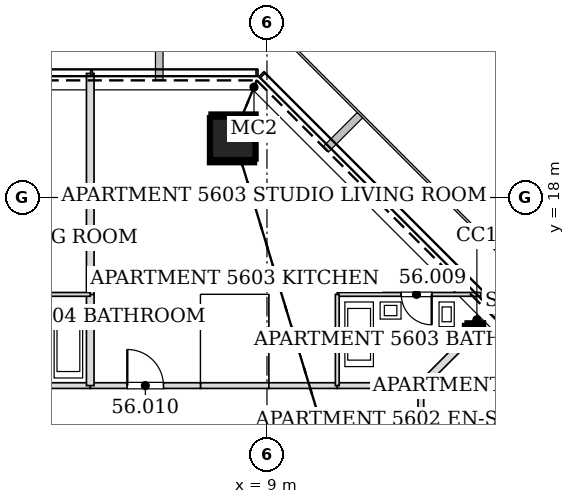
"""IFC4 building model, lengths in metres.
Left out: names, types, materials, properties, quantities, classifications, styles, units other than length and angle.
Written with IfcOpenShell. Run it as: python <this file> out.ifc"""

import sys

from ifc_helpers import new_model, si_unit, direction, frame, frame_2d, origin, origin_2d, place, context, subcontext, project, spatial, rectangle, hollow_rectangle, extrude, element, fill, save


model = new_model("IFC4")
c1 = context("Model", 3, precision=1e-05, world=origin(), true_north=direction((0.0, 1.0)))
c2 = subcontext(c1, "Body", "Model", "MODEL_VIEW")
j1 = project(units=[si_unit("LENGTHUNIT", "METRE"), si_unit("PLANEANGLEUNIT", "RADIAN")], contexts=[c1])
p1 = place(None, origin())
s1 = spatial("IfcSite", under=j1, at=p1, CompositionType="ELEMENT")
p2 = place(p1, origin())
s2 = spatial("IfcBuilding", under=s1, at=p2, CompositionType="ELEMENT")
p3 = place(p2, frame((0.0, 0.0, 238.0)))
s3 = spatial("IfcBuildingStorey", under=s2, at=p3, CompositionType="ELEMENT", Elevation=238.0)
p4 = place(p3, frame((8.12, 19.604, 0.0), z_axis=(-0.01169924247, -0.02827915051, 0.999531598986), x_axis=(0.924045401938, -0.382282742426, 0.0)))
e1 = element("IfcColumn", 1, at=p4, inside=s3, PredefinedType="COLUMN", context=c2, shape_type="SweptSolid", body=[
    extrude(hollow_rectangle(XDim=1.2, YDim=1.2, WallThickness=0.055, at=origin_2d()), origin(), (0.0, 0.0, 1.0), 3.402),
])
p5 = place(p3, frame((14.483, 14.483, 0.0), z_axis=(-0.01995470925, -0.01995470925, 0.999601730269), x_axis=(0.707106781187, -0.707106781187, 0.0)))
e2 = element("IfcColumn", 2, at=p5, inside=s3, PredefinedType="COLUMN", context=c2, shape_type="SweptSolid", body=[
    extrude(hollow_rectangle(XDim=0.45, YDim=0.45, WallThickness=0.02, at=origin_2d()), origin(), (0.0, 0.0, 1.0), 3.401),
])
p6 = place(p3, frame((13.05, 11.649, 0.0), z_axis=(0.0, 0.0, 1.0), x_axis=(0.0, 1.0, 0.0)))
e3 = element("IfcWall", 3, at=p6, inside=s3, PredefinedType="PARTITIONING", context=c2, shape_type="SweptSolid", body=[
    extrude(rectangle(XDim=1.401, YDim=0.15, at=frame_2d((0.701, 0.0))), origin(), (0.0, 0.0, 1.0), 2.588),
])
p7 = place(p3, frame((13.05, 13.05, 0.0), z_axis=(0.0, 0.0, 1.0), x_axis=(-1.0, 0.0, 0.0)))
e4 = element("IfcWall", 4, at=p7, inside=s3, PredefinedType="PARTITIONING", context=c2, shape_type="SweptSolid", body=[
    extrude(rectangle(XDim=2.201, YDim=0.15, at=frame_2d((1.101, 0.0))), origin(), (0.0, 0.0, 1.0), 2.588),
])
p8 = place(p3, frame((9.051, 13.05, 0.0), z_axis=(0.0, 0.0, 1.0), x_axis=(-1.0, 0.0, 0.0)))
e5 = element("IfcWall", 5, at=p8, inside=s3, PredefinedType="PARTITIONING", context=c2, shape_type="SweptSolid", body=[
    extrude(rectangle(XDim=1.802, YDim=0.15, at=frame_2d((0.901, 0.0))), origin(), (0.0, 0.0, 1.0), 2.662),
])
p9 = place(p3, frame((7.251, 13.05, 0.0), z_axis=(0.0, 0.0, 1.0), x_axis=(-1.0, 0.0, 0.0)))
e6 = element("IfcWall", 6, at=p9, inside=s3, PredefinedType="PARTITIONING", context=c2, shape_type="SweptSolid", body=[
    extrude(rectangle(XDim=2.902, YDim=0.15, at=frame_2d((1.451, 0.0))), origin(), (0.0, 0.0, 1.0), 2.662),
])
p10 = place(p9, frame((0.976, 0.0, 0.0)))
e7 = element("IfcOpeningElement", 7, at=p10, cuts=e6, PredefinedType="OPENING", context=c2, shape_type="SweptSolid", body=[
    extrude(rectangle(XDim=0.95, YDim=2.1, at=frame_2d((0.475, 1.05))), frame((0.0, 0.085, 0.0), z_axis=(0.0, -1.0, 0.0), x_axis=(1.0, 0.0, 0.0)), (0.0, 0.0, 1.0), 0.17),
])
p11 = place(p3, frame((10.851, 13.05, 0.0), z_axis=(0.0, 0.0, 1.0), x_axis=(-1.0, 0.0, 0.0)))
e8 = element("IfcWall", 8, at=p11, inside=s3, PredefinedType="PARTITIONING", context=c2, shape_type="SweptSolid", body=[
    extrude(rectangle(XDim=1.802, YDim=0.15, at=frame_2d((0.901, 0.0))), origin(), (0.0, 0.0, 1.0), 2.349),
])
p12 = place(p3, frame((4.351, 13.05, 0.0), z_axis=(0.0, 0.0, 1.0), x_axis=(-1.0, 0.0, 0.0)))
e9 = element("IfcWall", 9, at=p12, inside=s3, PredefinedType="PARTITIONING", context=c2, shape_type="SweptSolid", body=[
    extrude(rectangle(XDim=2.202, YDim=0.15, at=frame_2d((1.101, 0.0))), origin(), (0.0, 0.0, 1.0), 2.662),
])
p13 = place(p3, frame((14.242, 14.242, 0.0), z_axis=(0.0, 0.0, 1.0), x_axis=(-0.707106781187, -0.707106781187, 0.0)))
e10 = element("IfcWall", 10, at=p13, inside=s3, PredefinedType="PARTITIONING", context=c2, shape_type="SweptSolid", body=[
    extrude(rectangle(XDim=1.686, YDim=0.2, at=frame_2d((0.843, 0.0))), origin(), (0.0, 0.0, 1.0), 2.588),
])
p14 = place(p3, frame((14.625, 15.45, 0.0), z_axis=(0.0, 0.0, 1.0), x_axis=(-1.0, 0.0, 0.0)))
e11 = element("IfcWall", 11, at=p14, inside=s3, PredefinedType="PARTITIONING", context=c2, shape_type="SweptSolid", body=[
    extrude(rectangle(XDim=3.775, YDim=0.1, at=frame_2d((1.888, 0.0))), origin(), (0.0, 0.0, 1.0), 2.784),
])
p15 = place(p14, frame((1.291, 0.0, 0.0)))
e12 = element("IfcOpeningElement", 12, at=p15, cuts=e11, PredefinedType="OPENING", context=c2, shape_type="SweptSolid", body=[
    extrude(rectangle(XDim=0.8, YDim=2.1, at=frame_2d((0.4, 1.05))), frame((0.0, 0.06, 0.0), z_axis=(0.0, -1.0, 0.0), x_axis=(1.0, 0.0, 0.0)), (0.0, 0.0, 1.0), 0.12),
])
p16 = place(p3, frame((10.85, 15.45, 0.0), z_axis=(0.0, 0.0, 1.0), x_axis=(0.0, -1.0, 0.0)))
e13 = element("IfcWall", 13, at=p16, inside=s3, PredefinedType="PARTITIONING", context=c2, shape_type="SweptSolid", body=[
    extrude(rectangle(XDim=2.4, YDim=0.1, at=frame_2d((1.2, 0.0))), origin(), (0.0, 0.0, 1.0), 2.786),
])
p17 = place(p3, frame((4.35, 15.451, 0.0), z_axis=(0.0, 0.0, 1.0), x_axis=(0.0, -1.0, 0.0)))
e14 = element("IfcWall", 14, at=p17, inside=s3, PredefinedType="PARTITIONING", context=c2, shape_type="SweptSolid", body=[
    extrude(rectangle(XDim=2.401, YDim=0.2, at=frame_2d((1.2, 0.0))), origin(), (0.0, 0.0, 1.0), 2.662),
])
p18 = place(p3, frame((4.35, 21.264, 0.0), z_axis=(0.0, 0.0, 1.0), x_axis=(0.0, -1.0, 0.0)))
e15 = element("IfcWall", 15, at=p18, inside=s3, PredefinedType="PARTITIONING", context=c2, shape_type="SweptSolid", body=[
    extrude(rectangle(XDim=5.815, YDim=0.2, at=frame_2d((2.907, 0.0))), origin(), (0.0, 0.0, 1.0), 2.662),
])
p19 = place(p3, frame((4.35, 15.45, 0.0), z_axis=(0.0, 0.0, 1.0), x_axis=(-1.0, 0.0, 0.0)))
e16 = element("IfcWall", 16, at=p19, inside=s3, PredefinedType="PARTITIONING", context=c2, shape_type="SweptSolid", body=[
    extrude(rectangle(XDim=2.2, YDim=0.1, at=frame_2d((1.1, 0.0))), origin(), (0.0, 0.0, 1.0), 2.784),
])
p20 = place(p15, origin())
e17 = element("IfcDoor", 17, at=p20, inside=s3, OperationType="SINGLE_SWING_LEFT", PredefinedType="DOOR", context=c2, shape_type="SweptSolid", body=[
    extrude(rectangle(XDim=0.8, YDim=2.1, at=frame_2d((0.4, 1.05))), frame((0.0, 0.025, 0.0), z_axis=(0.0, -1.0, 0.0), x_axis=(1.0, 0.0, 0.0)), (0.0, 0.0, 1.0), 0.05),
])
fill(e12, e17)
p21 = place(p10, frame((0.95, 0.0, 0.0), z_axis=(0.0, 0.0, 1.0), x_axis=(-1.0, 0.0, 0.0)))
e18 = element("IfcDoor", 18, at=p21, inside=s3, OperationType="SINGLE_SWING_LEFT", PredefinedType="DOOR", context=c2, shape_type="SweptSolid", body=[
    extrude(rectangle(XDim=0.95, YDim=2.1, at=frame_2d((0.475, 1.05))), frame((0.0, 0.025, 0.0), z_axis=(0.0, -1.0, 0.0), x_axis=(1.0, 0.0, 0.0)), (0.0, 0.0, 1.0), 0.05),
])
fill(e7, e18)
save(model, sys.argv[1])
